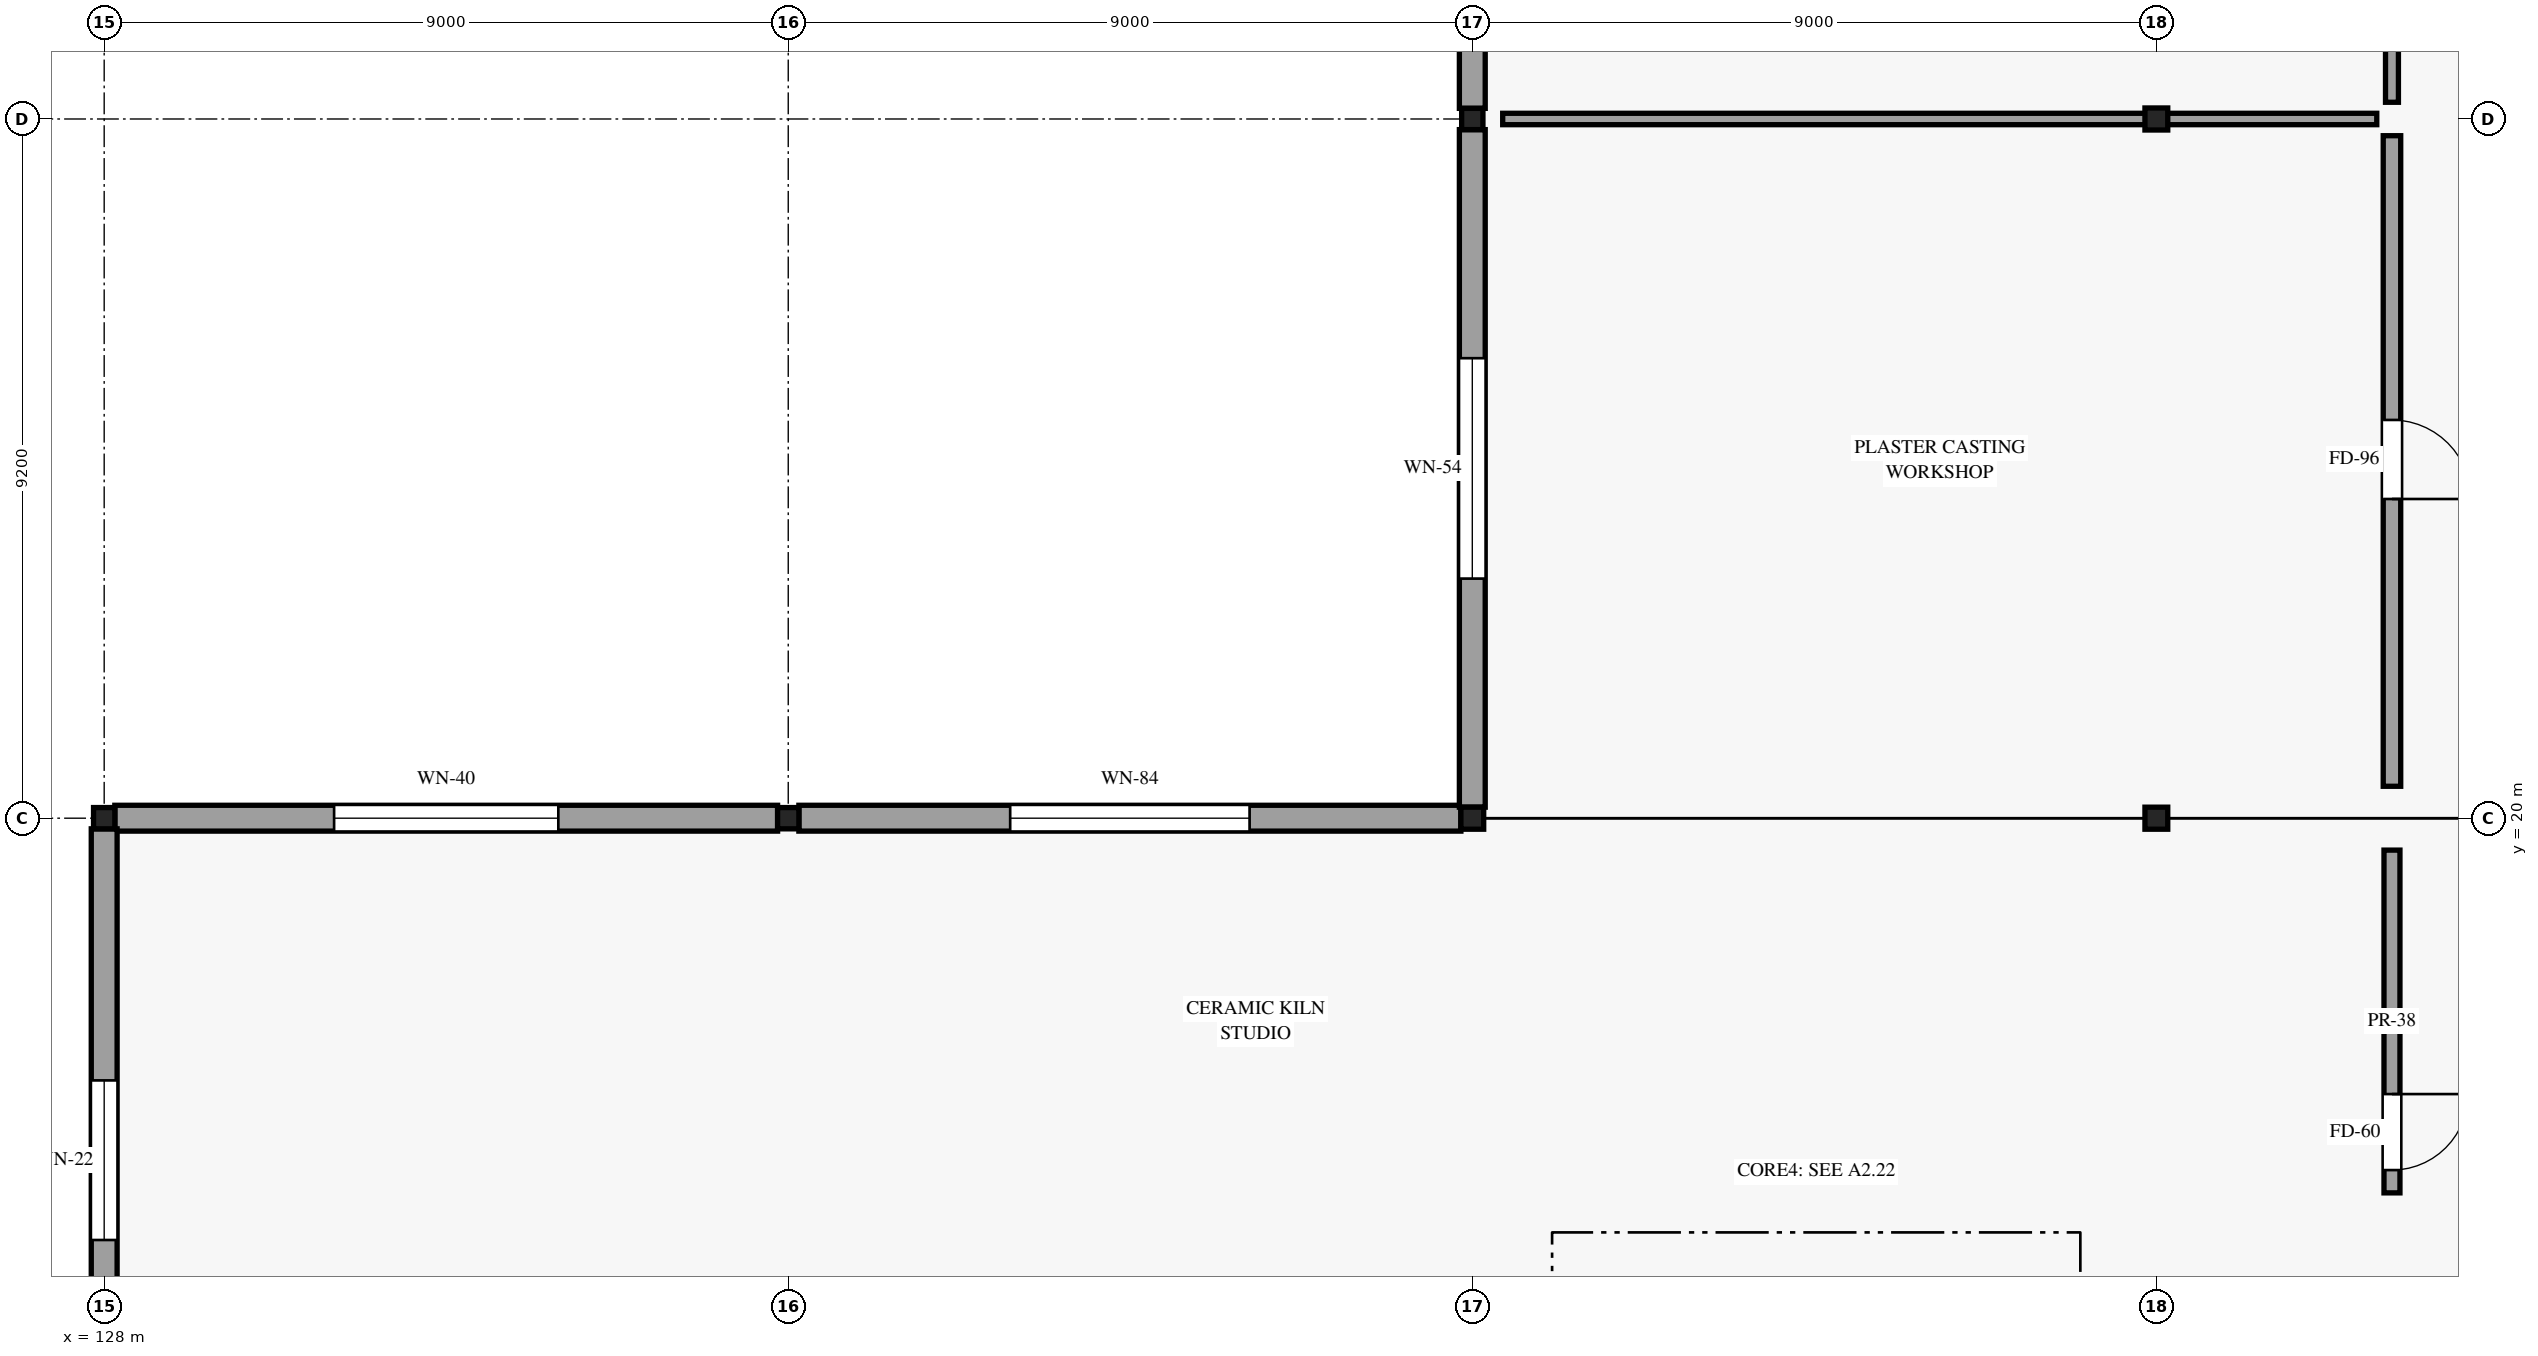
"""IFC4 building model, lengths in metres.
Left out: names, types, materials, properties, quantities, classifications, styles, units other than length and angle.
Written with IfcOpenShell. Run it as: python <this file> out.ifc"""

import sys

from ifc_helpers import new_model, si_unit, direction, frame, frame_2d, origin, origin_2d, place, context, subcontext, project, spatial, rectangle, i_section, extrude, element, fill, save


model = new_model("IFC4")
c1 = context("Model", 3, precision=1e-05, world=origin(), true_north=direction((0.0, 1.0)))
c2 = subcontext(c1, "Body", "Model", "MODEL_VIEW")
j1 = project(units=[si_unit("LENGTHUNIT", "METRE"), si_unit("PLANEANGLEUNIT", "RADIAN")], contexts=[c1])
p1 = place(None, origin())
s1 = spatial("IfcSite", under=j1, at=p1, CompositionType="ELEMENT")
p2 = place(p1, origin())
s2 = spatial("IfcBuilding", under=s1, at=p2, CompositionType="ELEMENT")
p3 = place(p2, frame((0.0, 0.0, 10.2)))
s3 = spatial("IfcBuildingStorey", under=s2, at=p3, CompositionType="ELEMENT", Elevation=10.2)
for number, where, z_axis, x_axis in (
    (1, (128.0, 20.0, 0.0), (0.0, 0.0, 1.0), (1.0, 0.0, 0.0)),
    (2, (137.0, 20.0, 0.0), (0.0, 0.0, 1.0), (1.0, 0.0, 0.0)),
):
    element("IfcColumn", number, at=place(p3, frame(where, z_axis=z_axis, x_axis=x_axis)), inside=s3, PredefinedType="COLUMN", context=c2, shape_type="SweptSolid", body=[
        extrude(i_section(OverallWidth=0.28, OverallDepth=0.28, WebThickness=0.01, FlangeThickness=0.018, FilletRadius=0.024, at=origin_2d()), origin(), (0.0, 0.0, 1.0), 4.8),
    ])
p4 = place(p3, frame((146.0, 20.0, 0.0), z_axis=(0.0, 0.0, 1.0), x_axis=(1.0, 0.0, 0.0)))
e3 = element("IfcColumn", 3, at=p4, inside=s3, PredefinedType="COLUMN", context=c2, shape_type="SweptSolid", body=[
    extrude(i_section(OverallWidth=0.3, OverallDepth=0.29, WebThickness=0.009, FlangeThickness=0.014, FilletRadius=0.027, at=origin_2d()), origin(), (0.0, 0.0, 1.0), 4.8),
])
p5 = place(p3, frame((146.0, 29.2, 0.0), z_axis=(0.0, 0.0, 1.0), x_axis=(1.0, 0.0, 0.0)))
e4 = element("IfcColumn", 4, at=p5, inside=s3, PredefinedType="COLUMN", context=c2, shape_type="SweptSolid", body=[
    extrude(i_section(OverallWidth=0.28, OverallDepth=0.28, WebThickness=0.01, FlangeThickness=0.018, FilletRadius=0.024, at=origin_2d()), origin(), (0.0, 0.0, 1.0), 4.8),
])
for number, where, z_axis, x_axis in (
    (5, (155.0, 20.0, 0.0), (0.0, 0.0, 1.0), (1.0, 0.0, 0.0)),
    (6, (155.0, 29.2, 0.0), (0.0, 0.0, 1.0), (1.0, 0.0, 0.0)),
):
    element("IfcColumn", number, at=place(p3, frame(where, z_axis=z_axis, x_axis=x_axis)), inside=s3, PredefinedType="COLUMN", context=c2, shape_type="SweptSolid", body=[
        extrude(i_section(OverallWidth=0.3, OverallDepth=0.29, WebThickness=0.009, FlangeThickness=0.014, FilletRadius=0.027, at=origin_2d()), origin(), (0.0, 0.0, 1.0), 4.8),
    ])
p6 = place(p3, frame((128.14, 20.0, 0.0), z_axis=(0.0, 0.0, 1.0), x_axis=(1.0, 0.0, 0.0)))
e7 = element("IfcWall", 7, at=p6, inside=s3, PredefinedType="STANDARD", context=c2, shape_type="SweptSolid", body=[
    extrude(rectangle(XDim=8.72, YDim=0.34, at=frame_2d((4.36, 0.0))), origin(), (0.0, 0.0, 1.0), 4.115),
])
p7 = place(p6, frame((2.885, 0.0, 0.85)))
e8 = element("IfcOpeningElement", 8, at=p7, cuts=e7, PredefinedType="OPENING", context=c2, shape_type="SweptSolid", body=[
    extrude(rectangle(XDim=2.95, YDim=2.5, at=frame_2d((1.475, 1.25))), frame((0.0, 0.18, 0.0), z_axis=(0.0, -1.0, 0.0), x_axis=(1.0, 0.0, 0.0)), (0.0, 0.0, 1.0), 0.36),
])
p8 = place(p3, frame((137.14, 20.0, 0.0), z_axis=(0.0, 0.0, 1.0), x_axis=(1.0, 0.0, 0.0)))
e9 = element("IfcWall", 9, at=p8, inside=s3, PredefinedType="STANDARD", context=c2, shape_type="SweptSolid", body=[
    extrude(rectangle(XDim=8.71, YDim=0.34, at=frame_2d((4.355, 0.0))), origin(), (0.0, 0.0, 1.0), 4.115),
])
p9 = place(p8, frame((2.78, 0.0, 0.85)))
e10 = element("IfcOpeningElement", 10, at=p9, cuts=e9, PredefinedType="OPENING", context=c2, shape_type="SweptSolid", body=[
    extrude(rectangle(XDim=3.15, YDim=2.55, at=frame_2d((1.575, 1.275))), frame((0.0, 0.18, 0.0), z_axis=(0.0, -1.0, 0.0), x_axis=(1.0, 0.0, 0.0)), (0.0, 0.0, 1.0), 0.36),
])
p10 = place(p3, frame((128.0, 11.14, 0.0), z_axis=(0.0, 0.0, 1.0), x_axis=(0.0, 1.0, 0.0)))
e11 = element("IfcWall", 11, at=p10, inside=s3, PredefinedType="STANDARD", context=c2, shape_type="SweptSolid", body=[
    extrude(rectangle(XDim=8.72, YDim=0.34, at=frame_2d((4.36, 0.0))), origin(), (0.0, 0.0, 1.0), 4.115),
])
p11 = place(p10, frame((3.31, 0.0, 0.85)))
e12 = element("IfcOpeningElement", 12, at=p11, cuts=e11, PredefinedType="OPENING", context=c2, shape_type="SweptSolid", body=[
    extrude(rectangle(XDim=2.1, YDim=2.45, at=frame_2d((1.05, 1.225))), frame((0.0, 0.18, 0.0), z_axis=(0.0, -1.0, 0.0), x_axis=(1.0, 0.0, 0.0)), (0.0, 0.0, 1.0), 0.36),
])
p12 = place(p3, frame((146.0, 20.145, 0.0), z_axis=(0.0, 0.0, 1.0), x_axis=(0.0, 1.0, 0.0)))
e13 = element("IfcWall", 13, at=p12, inside=s3, PredefinedType="STANDARD", context=c2, shape_type="SweptSolid", body=[
    extrude(rectangle(XDim=8.915, YDim=0.34, at=frame_2d((4.458, 0.0))), origin(), (0.0, 0.0, 1.0), 4.115),
])
p13 = place(p12, frame((3.008, 0.0, 0.85)))
e14 = element("IfcOpeningElement", 14, at=p13, cuts=e13, PredefinedType="OPENING", context=c2, shape_type="SweptSolid", body=[
    extrude(rectangle(XDim=2.9, YDim=2.25, at=frame_2d((1.45, 1.125))), frame((0.0, 0.18, 0.0), z_axis=(0.0, -1.0, 0.0), x_axis=(1.0, 0.0, 0.0)), (0.0, 0.0, 1.0), 0.36),
])
p14 = place(p3, frame((146.0, 29.34, 0.0), z_axis=(0.0, 0.0, 1.0), x_axis=(0.0, 1.0, 0.0)))
e15 = element("IfcWall", 15, at=p14, inside=s3, PredefinedType="STANDARD", context=c2, shape_type="SweptSolid", body=[
    extrude(rectangle(XDim=8.92, YDim=0.34, at=frame_2d((4.46, 0.0))), origin(), (0.0, 0.0, 1.0), 4.115),
])
p15 = place(p14, frame((2.76, 0.0, 0.85)))
e16 = element("IfcOpeningElement", 16, at=p15, cuts=e15, PredefinedType="OPENING", context=c2, shape_type="SweptSolid", body=[
    extrude(rectangle(XDim=3.4, YDim=2.4, at=frame_2d((1.7, 1.2))), frame((0.0, 0.18, 0.0), z_axis=(0.0, -1.0, 0.0), x_axis=(1.0, 0.0, 0.0)), (0.0, 0.0, 1.0), 0.36),
])
p16 = place(p3, frame((158.1, 15.07, 0.0), z_axis=(0.0, 0.0, 1.0), x_axis=(0.0, 1.0, 0.0)))
e17 = element("IfcWall", 17, at=p16, inside=s3, PredefinedType="PARTITIONING", context=c2, shape_type="SweptSolid", body=[
    extrude(rectangle(XDim=4.51, YDim=0.21, at=frame_2d((2.255, 0.0))), origin(), (0.0, 0.0, 1.0), 4.195),
])
p17 = place(p16, frame((1.3, 0.0, 0.0), z_axis=(0.0, 0.0, 1.0), x_axis=(-1.0, 0.0, 0.0)))
e18 = element("IfcOpeningElement", 18, at=p17, cuts=e17, PredefinedType="OPENING", context=c2, shape_type="SweptSolid", body=[
    extrude(rectangle(XDim=1.0, YDim=2.2, at=frame_2d((0.5, 1.1))), frame((0.0, 0.115, 0.0), z_axis=(0.0, -1.0, 0.0), x_axis=(1.0, 0.0, 0.0)), (0.0, 0.0, 1.0), 0.23),
])
p18 = place(p3, frame((158.1, 20.42, 0.0), z_axis=(0.0, 0.0, 1.0), x_axis=(0.0, 1.0, 0.0)))
e19 = element("IfcWall", 19, at=p18, inside=s3, PredefinedType="PARTITIONING", context=c2, shape_type="SweptSolid", body=[
    extrude(rectangle(XDim=8.56, YDim=0.23, at=frame_2d((4.28, 0.0))), origin(), (0.0, 0.0, 1.0), 4.115),
])
p19 = place(p18, frame((4.82, 0.0, 0.0), z_axis=(0.0, 0.0, 1.0), x_axis=(-1.0, 0.0, 0.0)))
e20 = element("IfcOpeningElement", 20, at=p19, cuts=e19, PredefinedType="OPENING", context=c2, shape_type="SweptSolid", body=[
    extrude(rectangle(XDim=1.04, YDim=2.22, at=frame_2d((0.52, 1.11))), frame((0.0, 0.125, 0.0), z_axis=(0.0, -1.0, 0.0), x_axis=(1.0, 0.0, 0.0)), (0.0, 0.0, 1.0), 0.25),
])
p20 = place(p3, frame((146.4, 29.2, 0.0), z_axis=(0.0, 0.0, 1.0), x_axis=(1.0, 0.0, 0.0)))
e21 = element("IfcWall", 21, at=p20, inside=s3, PredefinedType="PARTITIONING", context=c2, shape_type="SweptSolid", body=[
    extrude(rectangle(XDim=11.5, YDim=0.15, at=frame_2d((5.75, 0.0))), origin(), (0.0, 0.0, 1.0), 4.115),
])
p21 = place(p3, frame((158.1, 29.42, 0.0), z_axis=(0.0, 0.0, 1.0), x_axis=(0.0, 1.0, 0.0)))
e22 = element("IfcWall", 22, at=p21, inside=s3, PredefinedType="PARTITIONING", context=c2, shape_type="SweptSolid", body=[
    extrude(rectangle(XDim=8.76, YDim=0.17, at=frame_2d((4.38, 0.0))), origin(), (0.0, 0.0, 1.0), 4.115),
])
p22 = place(p21, frame((5.04, 0.0, 0.0), z_axis=(0.0, 0.0, 1.0), x_axis=(-1.0, 0.0, 0.0)))
e23 = element("IfcOpeningElement", 23, at=p22, cuts=e22, PredefinedType="OPENING", context=c2, shape_type="SweptSolid", body=[
    extrude(rectangle(XDim=1.16, YDim=2.28, at=frame_2d((0.58, 1.14))), frame((0.0, 0.095, 0.0), z_axis=(0.0, -1.0, 0.0), x_axis=(1.0, 0.0, 0.0)), (0.0, 0.0, 1.0), 0.19),
])
p23 = place(p7, origin())
e24 = element("IfcWindow", 24, at=p23, inside=s3, PartitioningType="SINGLE_PANEL", PredefinedType="WINDOW", context=c2, shape_type="SweptSolid", body=[
    extrude(rectangle(XDim=2.95, YDim=2.5, at=frame_2d((1.475, 1.25))), frame((0.0, 0.03, 0.0), z_axis=(0.0, -1.0, 0.0), x_axis=(1.0, 0.0, 0.0)), (0.0, 0.0, 1.0), 0.06),
])
fill(e8, e24)
p24 = place(p9, origin())
e25 = element("IfcWindow", 25, at=p24, inside=s3, PartitioningType="SINGLE_PANEL", PredefinedType="WINDOW", context=c2, shape_type="SweptSolid", body=[
    extrude(rectangle(XDim=3.15, YDim=2.55, at=frame_2d((1.575, 1.275))), frame((0.0, 0.03, 0.0), z_axis=(0.0, -1.0, 0.0), x_axis=(1.0, 0.0, 0.0)), (0.0, 0.0, 1.0), 0.06),
])
fill(e10, e25)
p25 = place(p11, origin())
e26 = element("IfcWindow", 26, at=p25, inside=s3, PartitioningType="SINGLE_PANEL", PredefinedType="WINDOW", context=c2, shape_type="SweptSolid", body=[
    extrude(rectangle(XDim=2.1, YDim=2.45, at=frame_2d((1.05, 1.225))), frame((0.0, 0.03, 0.0), z_axis=(0.0, -1.0, 0.0), x_axis=(1.0, 0.0, 0.0)), (0.0, 0.0, 1.0), 0.06),
])
fill(e12, e26)
p26 = place(p13, origin())
e27 = element("IfcWindow", 27, at=p26, inside=s3, PartitioningType="SINGLE_PANEL", PredefinedType="WINDOW", context=c2, shape_type="SweptSolid", body=[
    extrude(rectangle(XDim=2.9, YDim=2.25, at=frame_2d((1.45, 1.125))), frame((0.0, 0.03, 0.0), z_axis=(0.0, -1.0, 0.0), x_axis=(1.0, 0.0, 0.0)), (0.0, 0.0, 1.0), 0.06),
])
fill(e14, e27)
p27 = place(p17, origin())
e28 = element("IfcDoor", 28, at=p27, inside=s3, OperationType="SINGLE_SWING_LEFT", PredefinedType="DOOR", context=c2, shape_type="SweptSolid", body=[
    extrude(rectangle(XDim=1.0, YDim=2.2, at=frame_2d((0.5, 1.1))), frame((0.0, 0.025, 0.0), z_axis=(0.0, -1.0, 0.0), x_axis=(1.0, 0.0, 0.0)), (0.0, 0.0, 1.0), 0.05),
])
fill(e18, e28)
p28 = place(p19, origin())
e29 = element("IfcDoor", 29, at=p28, inside=s3, OperationType="SINGLE_SWING_RIGHT", PredefinedType="DOOR", context=c2, shape_type="SweptSolid", body=[
    extrude(rectangle(XDim=1.04, YDim=2.22, at=frame_2d((0.52, 1.11))), frame((0.0, 0.025, 0.0), z_axis=(0.0, -1.0, 0.0), x_axis=(1.0, 0.0, 0.0)), (0.0, 0.0, 1.0), 0.05),
])
fill(e20, e29)
save(model, sys.argv[1])
